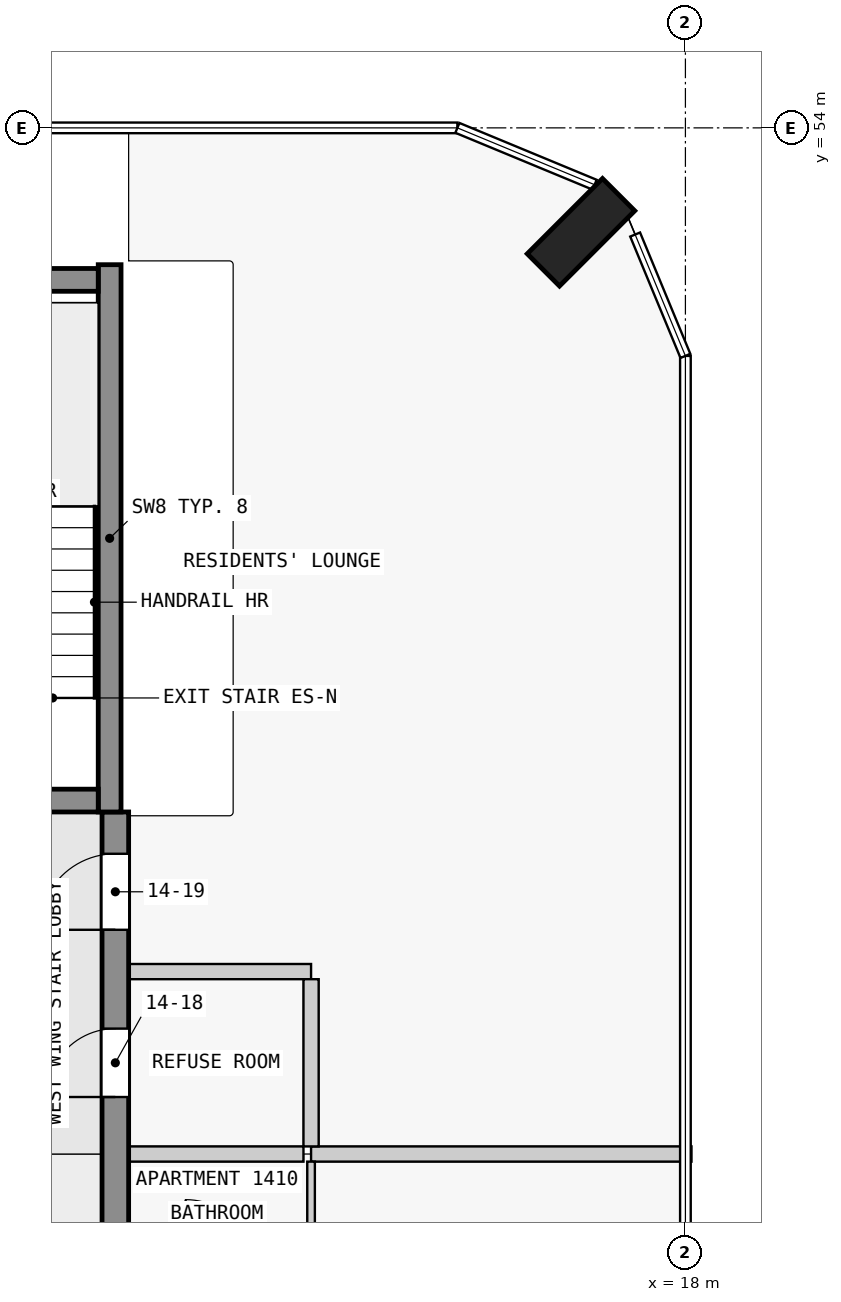
"""IFC4 building model, lengths in metres.
Left out: names, types, materials, properties, quantities, classifications, styles, units other than length and angle.
Written with IfcOpenShell. Run it as: python <this file> out.ifc"""

import sys

from ifc_helpers import new_model, si_unit, direction, frame, frame_2d, origin, origin_2d, place, context, subcontext, project, spatial, rectangle, extrude, element, fill, save


model = new_model("IFC4")
c1 = context("Model", 3, precision=1e-05, world=origin(), true_north=direction((0.0, 1.0)))
c2 = subcontext(c1, "Body", "Model", "MODEL_VIEW")
j1 = project(units=[si_unit("LENGTHUNIT", "METRE"), si_unit("PLANEANGLEUNIT", "RADIAN")], contexts=[c1])
p1 = place(None, origin())
s1 = spatial("IfcSite", under=j1, at=p1, CompositionType="ELEMENT")
p2 = place(p1, origin())
s2 = spatial("IfcBuilding", under=s1, at=p2, CompositionType="ELEMENT")
p3 = place(p2, frame((0.0, 0.0, 58.3)))
s3 = spatial("IfcBuildingStorey", under=s2, at=p3, CompositionType="ELEMENT", Elevation=58.3)
p4 = place(p3, frame((16.626, 52.626, 0.0), z_axis=(0.0, 0.0, 1.0), x_axis=(-0.707106781187, 0.707106781187, 0.0)))
e1 = element("IfcColumn", 1, at=p4, inside=s3, PredefinedType="COLUMN", context=c2, shape_type="SweptSolid", body=[
    extrude(rectangle(XDim=0.6, YDim=1.4, at=origin_2d()), origin(), (0.0, 0.0, 1.0), 3.5),
])
p5 = place(p3, frame((7.725, 45.15, 0.0), z_axis=(0.0, 0.0, 1.0), x_axis=(1.0, 0.0, 0.0)))
e2 = element("IfcWall", 2, at=p5, inside=s3, PredefinedType="SHEAR", context=c2, shape_type="SweptSolid", body=[
    extrude(rectangle(XDim=2.55, YDim=0.3, at=frame_2d((1.275, 0.0))), origin(), (0.0, 0.0, 1.0), 3.5),
])
p6 = place(p5, frame((0.725, 0.0, 0.0)))
e3 = element("IfcOpeningElement", 3, at=p6, cuts=e2, PredefinedType="OPENING", context=c2, shape_type="SweptSolid", body=[
    extrude(rectangle(XDim=1.1, YDim=2.1, at=frame_2d((0.55, 1.05))), frame((0.0, 0.16, 0.0), z_axis=(0.0, -1.0, 0.0), x_axis=(1.0, 0.0, 0.0)), (0.0, 0.0, 1.0), 0.32),
])
p7 = place(p3, frame((7.725, 52.0, 0.0), z_axis=(0.0, 0.0, 1.0), x_axis=(1.0, 0.0, 0.0)))
e4 = element("IfcWall", 4, at=p7, inside=s3, PredefinedType="SHEAR", context=c2, shape_type="SweptSolid", body=[
    extrude(rectangle(XDim=2.55, YDim=0.3, at=frame_2d((1.275, 0.0))), origin(), (0.0, 0.0, 1.0), 3.5),
])
p8 = place(p3, frame((10.425, 45.0, 0.0), z_axis=(0.0, 0.0, 1.0), x_axis=(0.0, 1.0, 0.0)))
e5 = element("IfcWall", 5, at=p8, inside=s3, PredefinedType="SHEAR", context=c2, shape_type="SweptSolid", body=[
    extrude(rectangle(XDim=7.2, YDim=0.3, at=frame_2d((3.6, 0.0))), origin(), (0.0, 0.0, 1.0), 3.5),
])
p9 = place(p3, frame((10.5, 18.0, 0.0), z_axis=(0.0, 0.0, 1.0), x_axis=(0.0, 1.0, 0.0)))
e6 = element("IfcWall", 6, at=p9, inside=s3, PredefinedType="SHEAR", context=c2, shape_type="SweptSolid", body=[
    extrude(rectangle(XDim=27.0, YDim=0.35, at=frame_2d((13.5, 0.0))), origin(), (0.0, 0.0, 1.0), 3.25),
])
p10 = place(p9, frame((4.05, 0.0, 0.0)))
e7 = element("IfcOpeningElement", 7, at=p10, cuts=e6, PredefinedType="OPENING", context=c2, shape_type="SweptSolid", body=[
    extrude(rectangle(XDim=1.0, YDim=2.1, at=frame_2d((0.5, 1.05))), frame((0.0, 0.185, 0.0), z_axis=(0.0, -1.0, 0.0), x_axis=(1.0, 0.0, 0.0)), (0.0, 0.0, 1.0), 0.37),
])
p11 = place(p9, frame((10.75, 0.0, 0.0)))
e8 = element("IfcOpeningElement", 8, at=p11, cuts=e6, PredefinedType="OPENING", context=c2, shape_type="SweptSolid", body=[
    extrude(rectangle(XDim=1.0, YDim=2.1, at=frame_2d((0.5, 1.05))), frame((0.0, 0.185, 0.0), z_axis=(0.0, -1.0, 0.0), x_axis=(1.0, 0.0, 0.0)), (0.0, 0.0, 1.0), 0.37),
])
p12 = place(p9, frame((15.25, 0.0, 0.0)))
e9 = element("IfcOpeningElement", 9, at=p12, cuts=e6, PredefinedType="OPENING", context=c2, shape_type="SweptSolid", body=[
    extrude(rectangle(XDim=1.0, YDim=2.1, at=frame_2d((0.5, 1.05))), frame((0.0, 0.185, 0.0), z_axis=(0.0, -1.0, 0.0), x_axis=(1.0, 0.0, 0.0)), (0.0, 0.0, 1.0), 0.37),
])
p13 = place(p9, frame((19.75, 0.0, 0.0)))
e10 = element("IfcOpeningElement", 10, at=p13, cuts=e6, PredefinedType="OPENING", context=c2, shape_type="SweptSolid", body=[
    extrude(rectangle(XDim=1.0, YDim=2.1, at=frame_2d((0.5, 1.05))), frame((0.0, 0.185, 0.0), z_axis=(0.0, -1.0, 0.0), x_axis=(1.0, 0.0, 0.0)), (0.0, 0.0, 1.0), 0.37),
])
p14 = place(p9, frame((23.25, 0.0, 0.0)))
e11 = element("IfcOpeningElement", 11, at=p14, cuts=e6, PredefinedType="OPENING", context=c2, shape_type="SweptSolid", body=[
    extrude(rectangle(XDim=0.9, YDim=2.1, at=frame_2d((0.45, 1.05))), frame((0.0, 0.185, 0.0), z_axis=(0.0, -1.0, 0.0), x_axis=(1.0, 0.0, 0.0)), (0.0, 0.0, 1.0), 0.37),
])
p15 = place(p9, frame((25.45, 0.0, 0.0)))
e12 = element("IfcOpeningElement", 12, at=p15, cuts=e6, PredefinedType="OPENING", context=c2, shape_type="SweptSolid", body=[
    extrude(rectangle(XDim=1.0, YDim=2.1, at=frame_2d((0.5, 1.05))), frame((0.0, 0.185, 0.0), z_axis=(0.0, -1.0, 0.0), x_axis=(1.0, 0.0, 0.0)), (0.0, 0.0, 1.0), 0.37),
])
p16 = place(p3, frame((12.975, 40.5, 0.0), z_axis=(0.0, 0.0, 1.0), x_axis=(-1.0, 0.0, 0.0)))
e13 = element("IfcWall", 13, at=p16, inside=s3, PredefinedType="PARTITIONING", context=c2, shape_type="SweptSolid", body=[
    extrude(rectangle(XDim=2.3, YDim=0.2, at=frame_2d((1.15, 0.0))), origin(), (0.0, 0.0, 1.0), 3.25),
])
p17 = place(p3, frame((13.075, 40.5, 0.0), z_axis=(0.0, 0.0, 1.0), x_axis=(1.0, 0.0, 0.0)))
e14 = element("IfcWall", 14, at=p17, inside=s3, PredefinedType="PARTITIONING", context=c2, shape_type="SweptSolid", body=[
    extrude(rectangle(XDim=5.005, YDim=0.2, at=frame_2d((2.502, 0.0))), origin(), (0.0, 0.0, 1.0), 3.25),
])
p18 = place(p3, frame((13.075, 42.9, 0.0), z_axis=(0.0, 0.0, 1.0), x_axis=(-1.0, 0.0, 0.0)))
e15 = element("IfcWall", 15, at=p18, inside=s3, PredefinedType="PARTITIONING", context=c2, shape_type="SweptSolid", body=[
    extrude(rectangle(XDim=2.4, YDim=0.2, at=frame_2d((1.2, 0.0))), origin(), (0.0, 0.0, 1.0), 3.25),
])
p19 = place(p3, frame((13.075, 39.05, 0.0), z_axis=(0.0, 0.0, 1.0), x_axis=(0.0, 1.0, 0.0)))
e16 = element("IfcWall", 16, at=p19, inside=s3, PredefinedType="PARTITIONING", context=c2, shape_type="SweptSolid", body=[
    extrude(rectangle(XDim=1.35, YDim=0.1, at=frame_2d((0.675, 0.0))), origin(), (0.0, 0.0, 1.0), 3.25),
])
p20 = place(p3, frame((13.075, 40.6, 0.0), z_axis=(0.0, 0.0, 1.0), x_axis=(0.0, 1.0, 0.0)))
e17 = element("IfcWall", 17, at=p20, inside=s3, PredefinedType="PARTITIONING", context=c2, shape_type="SweptSolid", body=[
    extrude(rectangle(XDim=2.2, YDim=0.2, at=frame_2d((1.1, 0.0))), origin(), (0.0, 0.0, 1.0), 3.25),
])
p21 = place(p14, origin())
e18 = element("IfcDoor", 18, at=p21, inside=s3, OperationType="SINGLE_SWING_RIGHT", PredefinedType="DOOR", context=c2, shape_type="SweptSolid", body=[
    extrude(rectangle(XDim=0.9, YDim=2.1, at=frame_2d((0.45, 1.05))), frame((0.0, 0.025, 0.0), z_axis=(0.0, -1.0, 0.0), x_axis=(1.0, 0.0, 0.0)), (0.0, 0.0, 1.0), 0.05),
])
fill(e11, e18)
p22 = place(p15, origin())
e19 = element("IfcDoor", 19, at=p22, inside=s3, OperationType="SINGLE_SWING_RIGHT", PredefinedType="DOOR", context=c2, shape_type="SweptSolid", body=[
    extrude(rectangle(XDim=1.0, YDim=2.1, at=frame_2d((0.5, 1.05))), frame((0.0, 0.025, 0.0), z_axis=(0.0, -1.0, 0.0), x_axis=(1.0, 0.0, 0.0)), (0.0, 0.0, 1.0), 0.05),
])
fill(e12, e19)
save(model, sys.argv[1])
